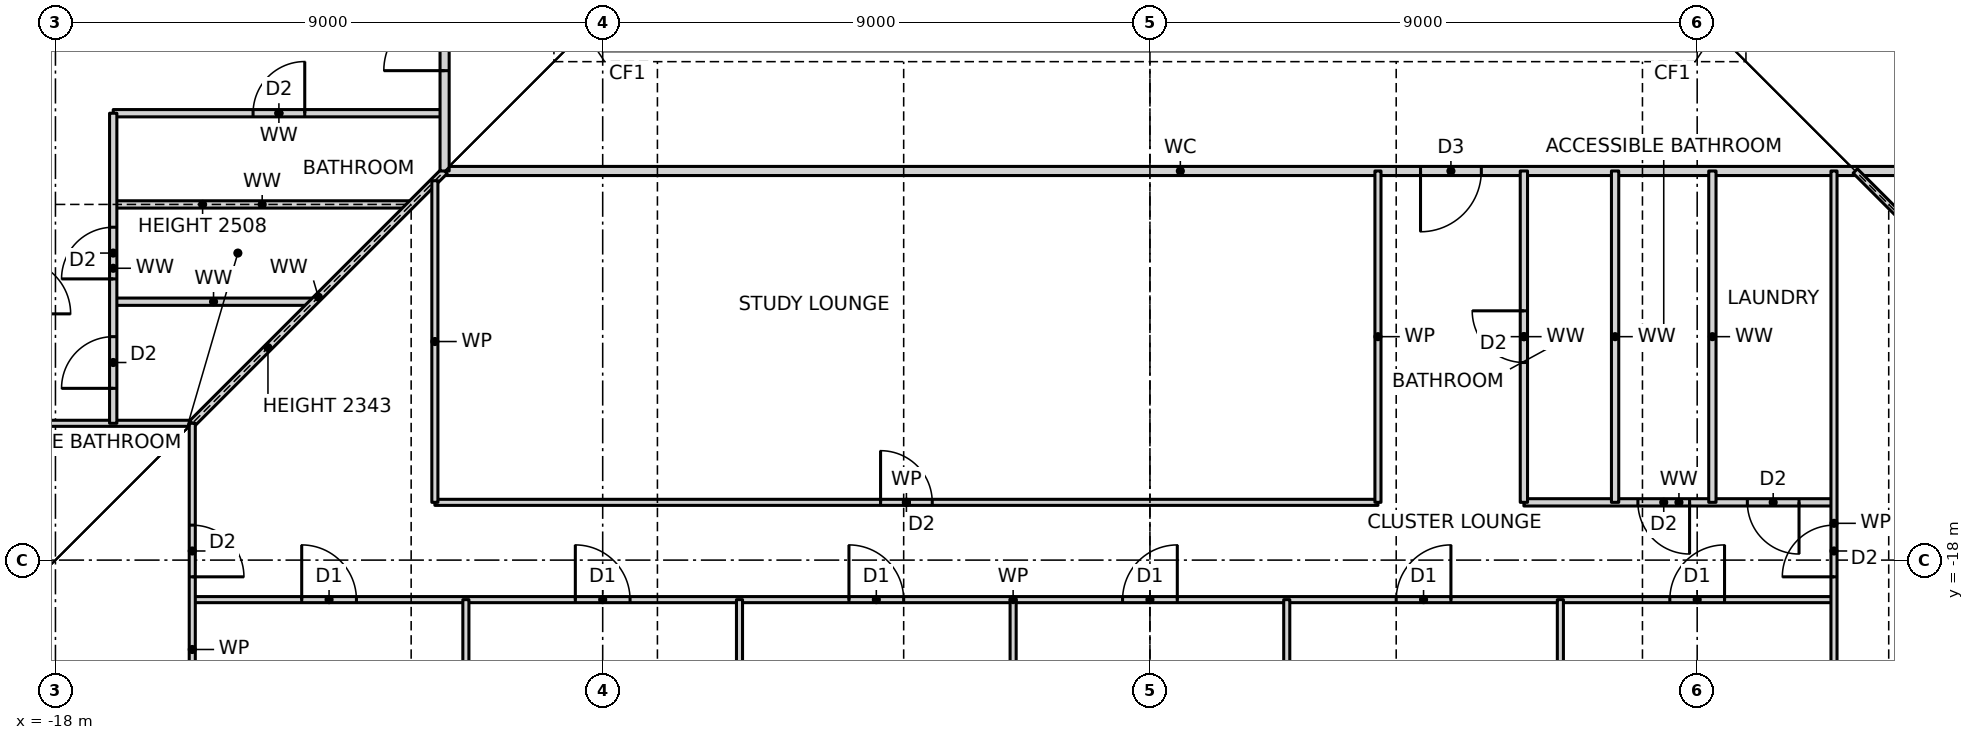
"""IFC4 building model, lengths in metres.
Left out: names, types, materials, properties, quantities, classifications, styles, units other than length and angle.
Written with IfcOpenShell. Run it as: python <this file> out.ifc"""

import sys

from ifc_helpers import new_model, si_unit, direction, frame, frame_2d, origin, place, context, subcontext, project, spatial, rectangle, extrude, element, fill, save


model = new_model("IFC4")
c1 = context("Model", 3, precision=1e-05, world=origin(), true_north=direction((0.0, 1.0)))
c2 = subcontext(c1, "Body", "Model", "MODEL_VIEW")
j1 = project(units=[si_unit("LENGTHUNIT", "METRE"), si_unit("PLANEANGLEUNIT", "RADIAN")], contexts=[c1])
p1 = place(None, origin())
s1 = spatial("IfcSite", under=j1, at=p1, CompositionType="ELEMENT")
p2 = place(p1, origin())
s2 = spatial("IfcBuilding", under=s1, at=p2, CompositionType="ELEMENT")
p3 = place(p2, frame((0.0, 0.0, 25.5)))
s3 = spatial("IfcBuildingStorey", under=s2, at=p3, CompositionType="ELEMENT", Elevation=25.5)
p4 = place(p3, frame((-15.75, -18.65, 0.0), z_axis=(0.0, 0.0, 1.0), x_axis=(1.0, 0.0, 0.0)))
e1 = element("IfcWall", 1, at=p4, inside=s3, PredefinedType="PARTITIONING", context=c2, shape_type="SweptSolid", body=[
    extrude(rectangle(XDim=27.0, YDim=0.1, at=frame_2d((13.5, 0.0))), origin(), (0.0, 0.0, 1.0), 3.27),
])
p5 = place(p4, frame((1.8, 0.0, 0.0)))
e2 = element("IfcOpeningElement", 2, at=p5, cuts=e1, PredefinedType="OPENING", context=c2, shape_type="SweptSolid", body=[
    extrude(rectangle(XDim=0.9, YDim=2.1, at=frame_2d((0.45, 1.05))), frame((0.0, 0.06, 0.0), z_axis=(0.0, -1.0, 0.0), x_axis=(1.0, 0.0, 0.0)), (0.0, 0.0, 1.0), 0.12),
])
p6 = place(p4, frame((6.3, 0.0, 0.0)))
e3 = element("IfcOpeningElement", 3, at=p6, cuts=e1, PredefinedType="OPENING", context=c2, shape_type="SweptSolid", body=[
    extrude(rectangle(XDim=0.9, YDim=2.1, at=frame_2d((0.45, 1.05))), frame((0.0, 0.06, 0.0), z_axis=(0.0, -1.0, 0.0), x_axis=(1.0, 0.0, 0.0)), (0.0, 0.0, 1.0), 0.12),
])
p7 = place(p4, frame((10.8, 0.0, 0.0)))
e4 = element("IfcOpeningElement", 4, at=p7, cuts=e1, PredefinedType="OPENING", context=c2, shape_type="SweptSolid", body=[
    extrude(rectangle(XDim=0.9, YDim=2.1, at=frame_2d((0.45, 1.05))), frame((0.0, 0.06, 0.0), z_axis=(0.0, -1.0, 0.0), x_axis=(1.0, 0.0, 0.0)), (0.0, 0.0, 1.0), 0.12),
])
p8 = place(p4, frame((15.3, 0.0, 0.0)))
e5 = element("IfcOpeningElement", 5, at=p8, cuts=e1, PredefinedType="OPENING", context=c2, shape_type="SweptSolid", body=[
    extrude(rectangle(XDim=0.9, YDim=2.1, at=frame_2d((0.45, 1.05))), frame((0.0, 0.06, 0.0), z_axis=(0.0, -1.0, 0.0), x_axis=(1.0, 0.0, 0.0)), (0.0, 0.0, 1.0), 0.12),
])
p9 = place(p4, frame((19.8, 0.0, 0.0)))
e6 = element("IfcOpeningElement", 6, at=p9, cuts=e1, PredefinedType="OPENING", context=c2, shape_type="SweptSolid", body=[
    extrude(rectangle(XDim=0.9, YDim=2.1, at=frame_2d((0.45, 1.05))), frame((0.0, 0.06, 0.0), z_axis=(0.0, -1.0, 0.0), x_axis=(1.0, 0.0, 0.0)), (0.0, 0.0, 1.0), 0.12),
])
p10 = place(p4, frame((24.3, 0.0, 0.0)))
e7 = element("IfcOpeningElement", 7, at=p10, cuts=e1, PredefinedType="OPENING", context=c2, shape_type="SweptSolid", body=[
    extrude(rectangle(XDim=0.9, YDim=2.1, at=frame_2d((0.45, 1.05))), frame((0.0, 0.06, 0.0), z_axis=(0.0, -1.0, 0.0), x_axis=(1.0, 0.0, 0.0)), (0.0, 0.0, 1.0), 0.12),
])
p11 = place(p3, frame((-11.76, -17.05, 0.0), z_axis=(0.0, 0.0, 1.0), x_axis=(1.0, 0.0, 0.0)))
e8 = element("IfcWall", 8, at=p11, inside=s3, PredefinedType="PARTITIONING", context=c2, shape_type="SweptSolid", body=[
    extrude(rectangle(XDim=15.51, YDim=0.1, at=frame_2d((7.755, 0.0))), origin(), (0.0, 0.0, 1.0), 3.27),
])
p12 = place(p11, frame((7.33, 0.0, 0.0)))
e9 = element("IfcOpeningElement", 9, at=p12, cuts=e8, PredefinedType="OPENING", context=c2, shape_type="SweptSolid", body=[
    extrude(rectangle(XDim=0.85, YDim=2.1, at=frame_2d((0.425, 1.05))), frame((0.0, 0.06, 0.0), z_axis=(0.0, -1.0, 0.0), x_axis=(1.0, 0.0, 0.0)), (0.0, 0.0, 1.0), 0.12),
])
p13 = place(p3, frame((6.15, -17.05, 0.0), z_axis=(0.0, 0.0, 1.0), x_axis=(1.0, 0.0, 0.0)))
e10 = element("IfcWall", 10, at=p13, inside=s3, PredefinedType="PARTITIONING", context=c2, shape_type="SweptSolid", body=[
    extrude(rectangle(XDim=5.1, YDim=0.12, at=frame_2d((2.55, 0.0))), origin(), (0.0, 0.0, 1.0), 3.27),
])
p14 = place(p13, frame((1.875, 0.0, 0.0)))
e11 = element("IfcOpeningElement", 11, at=p14, cuts=e10, PredefinedType="OPENING", context=c2, shape_type="SweptSolid", body=[
    extrude(rectangle(XDim=0.85, YDim=2.1, at=frame_2d((0.425, 1.05))), frame((0.0, 0.07, 0.0), z_axis=(0.0, -1.0, 0.0), x_axis=(1.0, 0.0, 0.0)), (0.0, 0.0, 1.0), 0.14),
])
p15 = place(p13, frame((3.675, 0.0, 0.0)))
e12 = element("IfcOpeningElement", 12, at=p15, cuts=e10, PredefinedType="OPENING", context=c2, shape_type="SweptSolid", body=[
    extrude(rectangle(XDim=0.85, YDim=2.1, at=frame_2d((0.425, 1.05))), frame((0.0, 0.07, 0.0), z_axis=(0.0, -1.0, 0.0), x_axis=(1.0, 0.0, 0.0)), (0.0, 0.0, 1.0), 0.14),
])
p16 = place(p3, frame((-23.19, -15.75, 0.0), z_axis=(0.0, 0.0, 1.0), x_axis=(1.0, 0.0, 0.0)))
e13 = element("IfcWall", 13, at=p16, inside=s3, PredefinedType="PARTITIONING", context=c2, shape_type="SweptSolid", body=[
    extrude(rectangle(XDim=7.44, YDim=0.1, at=frame_2d((3.72, 0.0))), origin(), (0.0, 0.0, 1.0), 3.27),
])
p17 = place(p3, frame((-17.05, -13.75, 0.0), z_axis=(0.0, 0.0, 1.0), x_axis=(1.0, 0.0, 0.0)))
e14 = element("IfcWall", 14, at=p17, inside=s3, PredefinedType="PARTITIONING", context=c2, shape_type="SweptSolid", body=[
    extrude(rectangle(XDim=3.3, YDim=0.12, at=frame_2d((1.65, 0.0))), origin(), (0.0, 0.0, 1.0), 3.27),
])
p18 = place(p3, frame((-17.05, -12.15, 0.0), z_axis=(0.0, 0.0, 1.0), x_axis=(1.0, 0.0, 0.0)))
e15 = element("IfcWall", 15, at=p18, inside=s3, PredefinedType="PARTITIONING", context=c2, shape_type="SweptSolid", body=[
    extrude(rectangle(XDim=4.9, YDim=0.12, at=frame_2d((2.45, 0.0))), origin(), (0.0, 0.0, 1.0), 2.508),
])
p19 = place(p3, frame((-11.6, -11.6, 0.0), z_axis=(0.0, 0.0, 1.0), x_axis=(1.0, 0.0, 0.0)))
e16 = element("IfcWall", 16, at=p19, inside=s3, PredefinedType="PARTITIONING", context=c2, shape_type="SweptSolid", body=[
    extrude(rectangle(XDim=24.2, YDim=0.15, at=frame_2d((12.1, 0.0))), origin(), (0.0, 0.0, 1.0), 3.27),
])
p20 = place(p19, frame((16.05, 0.0, 0.0)))
e17 = element("IfcOpeningElement", 17, at=p20, cuts=e16, PredefinedType="OPENING", context=c2, shape_type="SweptSolid", body=[
    extrude(rectangle(XDim=1.0, YDim=2.1, at=frame_2d((0.5, 1.05))), frame((0.0, 0.085, 0.0), z_axis=(0.0, -1.0, 0.0), x_axis=(1.0, 0.0, 0.0)), (0.0, 0.0, 1.0), 0.17),
])
p21 = place(p3, frame((-17.05, -10.65, 0.0), z_axis=(0.0, 0.0, 1.0), x_axis=(1.0, 0.0, 0.0)))
e18 = element("IfcWall", 18, at=p21, inside=s3, PredefinedType="PARTITIONING", context=c2, shape_type="SweptSolid", body=[
    extrude(rectangle(XDim=5.45, YDim=0.12, at=frame_2d((2.725, 0.0))), origin(), (0.0, 0.0, 1.0), 3.27),
])
p22 = place(p21, frame((2.3, 0.0, 0.0)))
e19 = element("IfcOpeningElement", 19, at=p22, cuts=e18, PredefinedType="OPENING", context=c2, shape_type="SweptSolid", body=[
    extrude(rectangle(XDim=0.85, YDim=2.1, at=frame_2d((0.425, 1.05))), frame((0.0, 0.07, 0.0), z_axis=(0.0, -1.0, 0.0), x_axis=(1.0, 0.0, 0.0)), (0.0, 0.0, 1.0), 0.14),
])
p23 = place(p3, frame((-15.75, -15.75, 0.0), z_axis=(0.0, 0.0, 1.0), x_axis=(0.707106781187, 0.707106781187, 0.0)))
e20 = element("IfcWall", 20, at=p23, inside=s3, PredefinedType="PARTITIONING", context=c2, shape_type="SweptSolid", body=[
    extrude(rectangle(XDim=5.869, YDim=0.12, at=frame_2d((2.935, 0.0))), origin(), (0.0, 0.0, 1.0), 2.343),
])
p24 = place(p3, frame((11.25, -23.19, 0.0), z_axis=(0.0, 0.0, 1.0), x_axis=(0.0, 1.0, 0.0)))
e21 = element("IfcWall", 21, at=p24, inside=s3, PredefinedType="PARTITIONING", context=c2, shape_type="SweptSolid", body=[
    extrude(rectangle(XDim=11.59, YDim=0.1, at=frame_2d((5.795, 0.0))), origin(), (0.0, 0.0, 1.0), 3.27),
])
p25 = place(p24, frame((4.915, 0.0, 0.0)))
e22 = element("IfcOpeningElement", 22, at=p25, cuts=e21, PredefinedType="OPENING", context=c2, shape_type="SweptSolid", body=[
    extrude(rectangle(XDim=0.85, YDim=2.1, at=frame_2d((0.425, 1.05))), frame((0.0, 0.06, 0.0), z_axis=(0.0, -1.0, 0.0), x_axis=(1.0, 0.0, 0.0)), (0.0, 0.0, 1.0), 0.12),
])
for number, where, z_axis, x_axis in (
    (23, (9.25, -17.05, 0.0), (0.0, 0.0, 1.0), (0.0, 1.0, 0.0)),
    (24, (7.65, -17.05, 0.0), (0.0, 0.0, 1.0), (0.0, 1.0, 0.0)),
):
    element("IfcWall", number, at=place(p3, frame(where, z_axis=z_axis, x_axis=x_axis)), inside=s3, PredefinedType="PARTITIONING", context=c2, shape_type="SweptSolid", body=[
        extrude(rectangle(XDim=5.45, YDim=0.12, at=frame_2d((2.725, 0.0))), origin(), (0.0, 0.0, 1.0), 3.27),
    ])
p26 = place(p3, frame((6.75, -23.19, 0.0), z_axis=(0.0, 0.0, 1.0), x_axis=(0.0, 1.0, 0.0)))
e25 = element("IfcWall", 25, at=p26, inside=s3, PredefinedType="PARTITIONING", context=c2, shape_type="SweptSolid", body=[
    extrude(rectangle(XDim=4.54, YDim=0.1, at=frame_2d((2.27, 0.0))), origin(), (0.0, 0.0, 1.0), 3.27),
])
p27 = place(p3, frame((6.15, -17.05, 0.0), z_axis=(0.0, 0.0, 1.0), x_axis=(0.0, 1.0, 0.0)))
e26 = element("IfcWall", 26, at=p27, inside=s3, PredefinedType="PARTITIONING", context=c2, shape_type="SweptSolid", body=[
    extrude(rectangle(XDim=5.45, YDim=0.12, at=frame_2d((2.725, 0.0))), origin(), (0.0, 0.0, 1.0), 3.27),
])
p28 = place(p27, frame((2.3, 0.0, 0.0)))
e27 = element("IfcOpeningElement", 27, at=p28, cuts=e26, PredefinedType="OPENING", context=c2, shape_type="SweptSolid", body=[
    extrude(rectangle(XDim=0.85, YDim=2.1, at=frame_2d((0.425, 1.05))), frame((0.0, 0.07, 0.0), z_axis=(0.0, -1.0, 0.0), x_axis=(1.0, 0.0, 0.0)), (0.0, 0.0, 1.0), 0.14),
])
p29 = place(p3, frame((3.75, -17.05, 0.0), z_axis=(0.0, 0.0, 1.0), x_axis=(0.0, 1.0, 0.0)))
e28 = element("IfcWall", 28, at=p29, inside=s3, PredefinedType="PARTITIONING", context=c2, shape_type="SweptSolid", body=[
    extrude(rectangle(XDim=5.45, YDim=0.1, at=frame_2d((2.725, 0.0))), origin(), (0.0, 0.0, 1.0), 3.27),
])
for number, where, z_axis, x_axis in (
    (29, (2.25, -23.19, 0.0), (0.0, 0.0, 1.0), (0.0, 1.0, 0.0)),
    (30, (-2.25, -23.19, 0.0), (0.0, 0.0, 1.0), (0.0, 1.0, 0.0)),
    (31, (-6.75, -23.19, 0.0), (0.0, 0.0, 1.0), (0.0, 1.0, 0.0)),
    (32, (-11.25, -23.19, 0.0), (0.0, 0.0, 1.0), (0.0, 1.0, 0.0)),
):
    element("IfcWall", number, at=place(p3, frame(where, z_axis=z_axis, x_axis=x_axis)), inside=s3, PredefinedType="PARTITIONING", context=c2, shape_type="SweptSolid", body=[
        extrude(rectangle(XDim=4.54, YDim=0.1, at=frame_2d((2.27, 0.0))), origin(), (0.0, 0.0, 1.0), 3.27),
    ])
p30 = place(p3, frame((-11.6, -11.6, 0.0), z_axis=(0.0, 0.0, 1.0), x_axis=(0.0, 1.0, 0.0)))
e33 = element("IfcWall", 33, at=p30, inside=s3, PredefinedType="PARTITIONING", context=c2, shape_type="SweptSolid", body=[
    extrude(rectangle(XDim=23.2, YDim=0.15, at=frame_2d((11.6, 0.0))), origin(), (0.0, 0.0, 1.0), 3.27),
])
p31 = place(p30, frame((1.65, 0.0, 0.0)))
e34 = element("IfcOpeningElement", 34, at=p31, cuts=e33, PredefinedType="OPENING", context=c2, shape_type="SweptSolid", body=[
    extrude(rectangle(XDim=1.0, YDim=2.1, at=frame_2d((0.5, 1.05))), frame((0.0, 0.085, 0.0), z_axis=(0.0, -1.0, 0.0), x_axis=(1.0, 0.0, 0.0)), (0.0, 0.0, 1.0), 0.17),
])
p32 = place(p3, frame((-11.76, -17.05, 0.0), z_axis=(0.0, 0.0, 1.0), x_axis=(0.0, 1.0, 0.0)))
e35 = element("IfcWall", 35, at=p32, inside=s3, PredefinedType="PARTITIONING", context=c2, shape_type="SweptSolid", body=[
    extrude(rectangle(XDim=5.29, YDim=0.1, at=frame_2d((2.645, 0.0))), origin(), (0.0, 0.0, 1.0), 3.27),
])
p33 = place(p3, frame((-15.75, -23.19, 0.0), z_axis=(0.0, 0.0, 1.0), x_axis=(0.0, 1.0, 0.0)))
e36 = element("IfcWall", 36, at=p33, inside=s3, PredefinedType="PARTITIONING", context=c2, shape_type="SweptSolid", body=[
    extrude(rectangle(XDim=7.44, YDim=0.1, at=frame_2d((3.72, 0.0))), origin(), (0.0, 0.0, 1.0), 3.27),
])
p34 = place(p33, frame((4.915, 0.0, 0.0)))
e37 = element("IfcOpeningElement", 37, at=p34, cuts=e36, PredefinedType="OPENING", context=c2, shape_type="SweptSolid", body=[
    extrude(rectangle(XDim=0.85, YDim=2.1, at=frame_2d((0.425, 1.05))), frame((0.0, 0.06, 0.0), z_axis=(0.0, -1.0, 0.0), x_axis=(1.0, 0.0, 0.0)), (0.0, 0.0, 1.0), 0.12),
])
p35 = place(p3, frame((-17.05, -15.75, 0.0), z_axis=(0.0, 0.0, 1.0), x_axis=(0.0, 1.0, 0.0)))
e38 = element("IfcWall", 38, at=p35, inside=s3, PredefinedType="PARTITIONING", context=c2, shape_type="SweptSolid", body=[
    extrude(rectangle(XDim=5.1, YDim=0.12, at=frame_2d((2.55, 0.0))), origin(), (0.0, 0.0, 1.0), 3.27),
])
p36 = place(p35, frame((2.375, 0.0, 0.0)))
e39 = element("IfcOpeningElement", 39, at=p36, cuts=e38, PredefinedType="OPENING", context=c2, shape_type="SweptSolid", body=[
    extrude(rectangle(XDim=0.85, YDim=2.1, at=frame_2d((0.425, 1.05))), frame((0.0, 0.07, 0.0), z_axis=(0.0, -1.0, 0.0), x_axis=(1.0, 0.0, 0.0)), (0.0, 0.0, 1.0), 0.14),
])
p37 = place(p35, frame((0.575, 0.0, 0.0)))
e40 = element("IfcOpeningElement", 40, at=p37, cuts=e38, PredefinedType="OPENING", context=c2, shape_type="SweptSolid", body=[
    extrude(rectangle(XDim=0.85, YDim=2.1, at=frame_2d((0.425, 1.05))), frame((0.0, 0.07, 0.0), z_axis=(0.0, -1.0, 0.0), x_axis=(1.0, 0.0, 0.0)), (0.0, 0.0, 1.0), 0.14),
])
p38 = place(p3, frame((15.75, -15.75, 0.0), z_axis=(0.0, 0.0, 1.0), x_axis=(-0.707106781187, 0.707106781187, 0.0)))
e41 = element("IfcWall", 41, at=p38, inside=s3, PredefinedType="PARTITIONING", context=c2, shape_type="SweptSolid", body=[
    extrude(rectangle(XDim=5.869, YDim=0.1, at=frame_2d((2.935, 0.0))), origin(), (0.0, 0.0, 1.0), 2.343),
])
p39 = place(p5, origin())
e42 = element("IfcDoor", 42, at=p39, inside=s3, OperationType="SINGLE_SWING_LEFT", PredefinedType="DOOR", context=c2, shape_type="SweptSolid", body=[
    extrude(rectangle(XDim=0.9, YDim=2.1, at=frame_2d((0.45, 1.05))), frame((0.0, 0.025, 0.0), z_axis=(0.0, -1.0, 0.0), x_axis=(1.0, 0.0, 0.0)), (0.0, 0.0, 1.0), 0.05),
])
fill(e2, e42)
p40 = place(p6, origin())
e43 = element("IfcDoor", 43, at=p40, inside=s3, OperationType="SINGLE_SWING_LEFT", PredefinedType="DOOR", context=c2, shape_type="SweptSolid", body=[
    extrude(rectangle(XDim=0.9, YDim=2.1, at=frame_2d((0.45, 1.05))), frame((0.0, 0.025, 0.0), z_axis=(0.0, -1.0, 0.0), x_axis=(1.0, 0.0, 0.0)), (0.0, 0.0, 1.0), 0.05),
])
fill(e3, e43)
p41 = place(p7, origin())
e44 = element("IfcDoor", 44, at=p41, inside=s3, OperationType="SINGLE_SWING_LEFT", PredefinedType="DOOR", context=c2, shape_type="SweptSolid", body=[
    extrude(rectangle(XDim=0.9, YDim=2.1, at=frame_2d((0.45, 1.05))), frame((0.0, 0.025, 0.0), z_axis=(0.0, -1.0, 0.0), x_axis=(1.0, 0.0, 0.0)), (0.0, 0.0, 1.0), 0.05),
])
fill(e4, e44)
p42 = place(p8, origin())
e45 = element("IfcDoor", 45, at=p42, inside=s3, OperationType="SINGLE_SWING_RIGHT", PredefinedType="DOOR", context=c2, shape_type="SweptSolid", body=[
    extrude(rectangle(XDim=0.9, YDim=2.1, at=frame_2d((0.45, 1.05))), frame((0.0, 0.025, 0.0), z_axis=(0.0, -1.0, 0.0), x_axis=(1.0, 0.0, 0.0)), (0.0, 0.0, 1.0), 0.05),
])
fill(e5, e45)
p43 = place(p9, origin())
e46 = element("IfcDoor", 46, at=p43, inside=s3, OperationType="SINGLE_SWING_RIGHT", PredefinedType="DOOR", context=c2, shape_type="SweptSolid", body=[
    extrude(rectangle(XDim=0.9, YDim=2.1, at=frame_2d((0.45, 1.05))), frame((0.0, 0.025, 0.0), z_axis=(0.0, -1.0, 0.0), x_axis=(1.0, 0.0, 0.0)), (0.0, 0.0, 1.0), 0.05),
])
fill(e6, e46)
p44 = place(p10, origin())
e47 = element("IfcDoor", 47, at=p44, inside=s3, OperationType="SINGLE_SWING_RIGHT", PredefinedType="DOOR", context=c2, shape_type="SweptSolid", body=[
    extrude(rectangle(XDim=0.9, YDim=2.1, at=frame_2d((0.45, 1.05))), frame((0.0, 0.025, 0.0), z_axis=(0.0, -1.0, 0.0), x_axis=(1.0, 0.0, 0.0)), (0.0, 0.0, 1.0), 0.05),
])
fill(e7, e47)
p45 = place(p20, frame((1.0, 0.0, 0.0), z_axis=(0.0, 0.0, 1.0), x_axis=(-1.0, 0.0, 0.0)))
e48 = element("IfcDoor", 48, at=p45, inside=s3, OperationType="SINGLE_SWING_RIGHT", PredefinedType="DOOR", context=c2, shape_type="SweptSolid", body=[
    extrude(rectangle(XDim=1.0, YDim=2.1, at=frame_2d((0.5, 1.05))), frame((0.0, 0.025, 0.0), z_axis=(0.0, -1.0, 0.0), x_axis=(1.0, 0.0, 0.0)), (0.0, 0.0, 1.0), 0.05),
])
fill(e17, e48)
p46 = place(p12, origin())
e49 = element("IfcDoor", 49, at=p46, inside=s3, OperationType="SINGLE_SWING_LEFT", PredefinedType="DOOR", context=c2, shape_type="SweptSolid", body=[
    extrude(rectangle(XDim=0.85, YDim=2.1, at=frame_2d((0.425, 1.05))), frame((0.0, 0.025, 0.0), z_axis=(0.0, -1.0, 0.0), x_axis=(1.0, 0.0, 0.0)), (0.0, 0.0, 1.0), 0.05),
])
fill(e9, e49)
p47 = place(p28, origin())
e50 = element("IfcDoor", 50, at=p47, inside=s3, OperationType="SINGLE_SWING_RIGHT", PredefinedType="DOOR", context=c2, shape_type="SweptSolid", body=[
    extrude(rectangle(XDim=0.85, YDim=2.1, at=frame_2d((0.425, 1.05))), frame((0.0, 0.025, 0.0), z_axis=(0.0, -1.0, 0.0), x_axis=(1.0, 0.0, 0.0)), (0.0, 0.0, 1.0), 0.05),
])
fill(e27, e50)
p48 = place(p14, frame((0.85, 0.0, 0.0), z_axis=(0.0, 0.0, 1.0), x_axis=(-1.0, 0.0, 0.0)))
e51 = element("IfcDoor", 51, at=p48, inside=s3, OperationType="SINGLE_SWING_LEFT", PredefinedType="DOOR", context=c2, shape_type="SweptSolid", body=[
    extrude(rectangle(XDim=0.85, YDim=2.1, at=frame_2d((0.425, 1.05))), frame((0.0, 0.025, 0.0), z_axis=(0.0, -1.0, 0.0), x_axis=(1.0, 0.0, 0.0)), (0.0, 0.0, 1.0), 0.05),
])
fill(e11, e51)
p49 = place(p15, frame((0.85, 0.0, 0.0), z_axis=(0.0, 0.0, 1.0), x_axis=(-1.0, 0.0, 0.0)))
e52 = element("IfcDoor", 52, at=p49, inside=s3, OperationType="SINGLE_SWING_LEFT", PredefinedType="DOOR", context=c2, shape_type="SweptSolid", body=[
    extrude(rectangle(XDim=0.85, YDim=2.1, at=frame_2d((0.425, 1.05))), frame((0.0, 0.025, 0.0), z_axis=(0.0, -1.0, 0.0), x_axis=(1.0, 0.0, 0.0)), (0.0, 0.0, 1.0), 0.05),
])
fill(e12, e52)
p50 = place(p25, origin())
e53 = element("IfcDoor", 53, at=p50, inside=s3, OperationType="SINGLE_SWING_LEFT", PredefinedType="DOOR", context=c2, shape_type="SweptSolid", body=[
    extrude(rectangle(XDim=0.85, YDim=2.1, at=frame_2d((0.425, 1.05))), frame((0.0, 0.025, 0.0), z_axis=(0.0, -1.0, 0.0), x_axis=(1.0, 0.0, 0.0)), (0.0, 0.0, 1.0), 0.05),
])
fill(e22, e53)
p51 = place(p31, origin())
e54 = element("IfcDoor", 54, at=p51, inside=s3, OperationType="SINGLE_SWING_LEFT", PredefinedType="DOOR", context=c2, shape_type="SweptSolid", body=[
    extrude(rectangle(XDim=1.0, YDim=2.1, at=frame_2d((0.5, 1.05))), frame((0.0, 0.025, 0.0), z_axis=(0.0, -1.0, 0.0), x_axis=(1.0, 0.0, 0.0)), (0.0, 0.0, 1.0), 0.05),
])
fill(e34, e54)
p52 = place(p22, origin())
e55 = element("IfcDoor", 55, at=p52, inside=s3, OperationType="SINGLE_SWING_RIGHT", PredefinedType="DOOR", context=c2, shape_type="SweptSolid", body=[
    extrude(rectangle(XDim=0.85, YDim=2.1, at=frame_2d((0.425, 1.05))), frame((0.0, 0.025, 0.0), z_axis=(0.0, -1.0, 0.0), x_axis=(1.0, 0.0, 0.0)), (0.0, 0.0, 1.0), 0.05),
])
fill(e19, e55)
p53 = place(p36, origin())
e56 = element("IfcDoor", 56, at=p53, inside=s3, OperationType="SINGLE_SWING_LEFT", PredefinedType="DOOR", context=c2, shape_type="SweptSolid", body=[
    extrude(rectangle(XDim=0.85, YDim=2.1, at=frame_2d((0.425, 1.05))), frame((0.0, 0.025, 0.0), z_axis=(0.0, -1.0, 0.0), x_axis=(1.0, 0.0, 0.0)), (0.0, 0.0, 1.0), 0.05),
])
fill(e39, e56)
p54 = place(p37, origin())
e57 = element("IfcDoor", 57, at=p54, inside=s3, OperationType="SINGLE_SWING_LEFT", PredefinedType="DOOR", context=c2, shape_type="SweptSolid", body=[
    extrude(rectangle(XDim=0.85, YDim=2.1, at=frame_2d((0.425, 1.05))), frame((0.0, 0.025, 0.0), z_axis=(0.0, -1.0, 0.0), x_axis=(1.0, 0.0, 0.0)), (0.0, 0.0, 1.0), 0.05),
])
fill(e40, e57)
p55 = place(p34, frame((0.85, 0.0, 0.0), z_axis=(0.0, 0.0, 1.0), x_axis=(-1.0, 0.0, 0.0)))
e58 = element("IfcDoor", 58, at=p55, inside=s3, OperationType="SINGLE_SWING_RIGHT", PredefinedType="DOOR", context=c2, shape_type="SweptSolid", body=[
    extrude(rectangle(XDim=0.85, YDim=2.1, at=frame_2d((0.425, 1.05))), frame((0.0, 0.025, 0.0), z_axis=(0.0, -1.0, 0.0), x_axis=(1.0, 0.0, 0.0)), (0.0, 0.0, 1.0), 0.05),
])
fill(e37, e58)
save(model, sys.argv[1])
